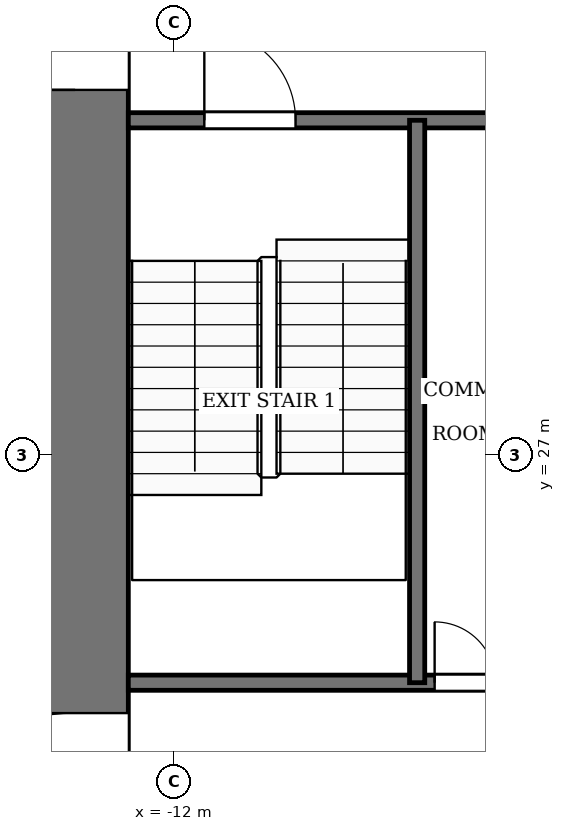
"""IFC4 building model, lengths in metres.
Left out: names, types, materials, properties, quantities, classifications, styles, units other than length and angle.
Written with IfcOpenShell. Run it as: python <this file> out.ifc"""

import sys

from ifc_helpers import new_model, si_unit, direction, frame, frame_2d, origin, place, context, subcontext, project, spatial, rectangle, extrude, element, fill, save


model = new_model("IFC4")
c1 = context("Model", 3, precision=1e-05, world=origin(), true_north=direction((0.0, 1.0)))
c2 = subcontext(c1, "Body", "Model", "MODEL_VIEW")
j1 = project(units=[si_unit("LENGTHUNIT", "METRE"), si_unit("PLANEANGLEUNIT", "RADIAN")], contexts=[c1])
p1 = place(None, origin())
s1 = spatial("IfcSite", under=j1, at=p1, CompositionType="ELEMENT")
p2 = place(p1, origin())
s2 = spatial("IfcBuilding", under=s1, at=p2, CompositionType="ELEMENT")
p3 = place(p2, frame((0.0, 0.0, 54.0)))
s3 = spatial("IfcBuildingStorey", under=s2, at=p3, CompositionType="ELEMENT", Elevation=54.0)
p4 = place(p3, frame((-13.3, 18.4, -0.13), z_axis=(0.0, 0.0, 1.0), x_axis=(0.0, 1.0, 0.0)))
e1 = element("IfcWall", 1, at=p4, inside=s3, PredefinedType="SHEAR", context=c2, shape_type="SweptSolid", body=[
    extrude(rectangle(XDim=19.2, YDim=1.4, at=frame_2d((9.6, 0.0))), origin(), (0.0, 0.0, 1.0), 3.88),
])
p5 = place(p4, frame((2.8, 0.0, 0.13)))
e2 = element("IfcOpeningElement", 2, at=p5, cuts=e1, PredefinedType="OPENING", context=c2, shape_type="SweptSolid", body=[
    extrude(rectangle(XDim=2.4, YDim=2.4, at=frame_2d((1.2, 1.2))), frame((0.0, 0.71, 0.0), z_axis=(0.0, -1.0, 0.0), x_axis=(1.0, 0.0, 0.0)), (0.0, 0.0, 1.0), 1.42),
])
p6 = place(p4, frame((13.4, 0.0, 0.13)))
e3 = element("IfcOpeningElement", 3, at=p6, cuts=e1, PredefinedType="OPENING", context=c2, shape_type="SweptSolid", body=[
    extrude(rectangle(XDim=1.4, YDim=2.2, at=frame_2d((0.7, 1.1))), frame((0.0, 0.71, 0.0), z_axis=(0.0, -1.0, 0.0), x_axis=(1.0, 0.0, 0.0)), (0.0, 0.0, 1.0), 1.42),
])
p7 = place(p3, frame((-12.6, 24.0, 0.0), z_axis=(0.0, 0.0, 1.0), x_axis=(1.0, 0.0, 0.0)))
e4 = element("IfcWall", 4, at=p7, inside=s3, PredefinedType="PARTITIONING", context=c2, shape_type="SweptSolid", body=[
    extrude(rectangle(XDim=6.6, YDim=0.2, at=frame_2d((3.3, 0.0))), origin(), (0.0, 0.0, 1.0), 3.75),
])
p8 = place(p7, frame((4.03, 0.0, 0.0)))
e5 = element("IfcOpeningElement", 5, at=p8, cuts=e4, PredefinedType="OPENING", context=c2, shape_type="SweptSolid", body=[
    extrude(rectangle(XDim=0.8, YDim=2.1, at=frame_2d((0.4, 1.05))), frame((0.0, 0.11, 0.0), z_axis=(0.0, -1.0, 0.0), x_axis=(1.0, 0.0, 0.0)), (0.0, 0.0, 1.0), 0.22),
])
p9 = place(p7, frame((5.33, 0.0, 0.0)))
e6 = element("IfcOpeningElement", 6, at=p9, cuts=e4, PredefinedType="OPENING", context=c2, shape_type="SweptSolid", body=[
    extrude(rectangle(XDim=1.0, YDim=2.1, at=frame_2d((0.5, 1.05))), frame((0.0, 0.11, 0.0), z_axis=(0.0, -1.0, 0.0), x_axis=(1.0, 0.0, 0.0)), (0.0, 0.0, 1.0), 0.22),
])
p10 = place(p3, frame((-12.6, 31.4, 0.0), z_axis=(0.0, 0.0, 1.0), x_axis=(1.0, 0.0, 0.0)))
e7 = element("IfcWall", 7, at=p10, inside=s3, PredefinedType="PARTITIONING", context=c2, shape_type="SweptSolid", body=[
    extrude(rectangle(XDim=6.6, YDim=0.2, at=frame_2d((3.3, 0.0))), origin(), (0.0, 0.0, 1.0), 3.75),
])
p11 = place(p10, frame((1.0, 0.0, 0.0)))
e8 = element("IfcOpeningElement", 8, at=p11, cuts=e7, PredefinedType="OPENING", context=c2, shape_type="SweptSolid", body=[
    extrude(rectangle(XDim=1.2, YDim=2.2, at=frame_2d((0.6, 1.1))), frame((0.0, 0.11, 0.0), z_axis=(0.0, -1.0, 0.0), x_axis=(1.0, 0.0, 0.0)), (0.0, 0.0, 1.0), 0.22),
])
p12 = place(p3, frame((-8.8, 24.0, 0.0), z_axis=(0.0, 0.0, 1.0), x_axis=(0.0, 1.0, 0.0)))
e9 = element("IfcWall", 9, at=p12, inside=s3, PredefinedType="PARTITIONING", context=c2, shape_type="SweptSolid", body=[
    extrude(rectangle(XDim=7.4, YDim=0.2, at=frame_2d((3.7, 0.0))), origin(), (0.0, 0.0, 1.0), 3.75),
])
p13 = place(p8, origin())
e10 = element("IfcDoor", 10, at=p13, inside=s3, OperationType="SINGLE_SWING_RIGHT", PredefinedType="DOOR", context=c2, shape_type="SweptSolid", body=[
    extrude(rectangle(XDim=0.8, YDim=2.1, at=frame_2d((0.4, 1.05))), frame((0.0, 0.025, 0.0), z_axis=(0.0, -1.0, 0.0), x_axis=(1.0, 0.0, 0.0)), (0.0, 0.0, 1.0), 0.05),
])
fill(e5, e10)
p14 = place(p11, origin())
e11 = element("IfcDoor", 11, at=p14, inside=s3, OperationType="SINGLE_SWING_LEFT", PredefinedType="DOOR", context=c2, shape_type="SweptSolid", body=[
    extrude(rectangle(XDim=1.2, YDim=2.2, at=frame_2d((0.6, 1.1))), frame((0.0, 0.025, 0.0), z_axis=(0.0, -1.0, 0.0), x_axis=(1.0, 0.0, 0.0)), (0.0, 0.0, 1.0), 0.05),
])
fill(e8, e11)
p15 = place(p5, origin())
e12 = element("IfcDoor", 12, at=p15, inside=s3, OperationType="DOUBLE_DOOR_SINGLE_SWING", PredefinedType="DOOR", context=c2, shape_type="SweptSolid", body=[
    extrude(rectangle(XDim=2.4, YDim=2.4, at=frame_2d((1.2, 1.2))), frame((0.0, 0.025, 0.0), z_axis=(0.0, -1.0, 0.0), x_axis=(1.0, 0.0, 0.0)), (0.0, 0.0, 1.0), 0.05),
])
fill(e2, e12)
p16 = place(p6, origin())
e13 = element("IfcDoor", 13, at=p16, inside=s3, OperationType="SINGLE_SWING_LEFT", PredefinedType="DOOR", context=c2, shape_type="SweptSolid", body=[
    extrude(rectangle(XDim=1.4, YDim=2.2, at=frame_2d((0.7, 1.1))), frame((0.0, 0.025, 0.0), z_axis=(0.0, -1.0, 0.0), x_axis=(1.0, 0.0, 0.0)), (0.0, 0.0, 1.0), 0.05),
])
fill(e3, e13)
save(model, sys.argv[1])
